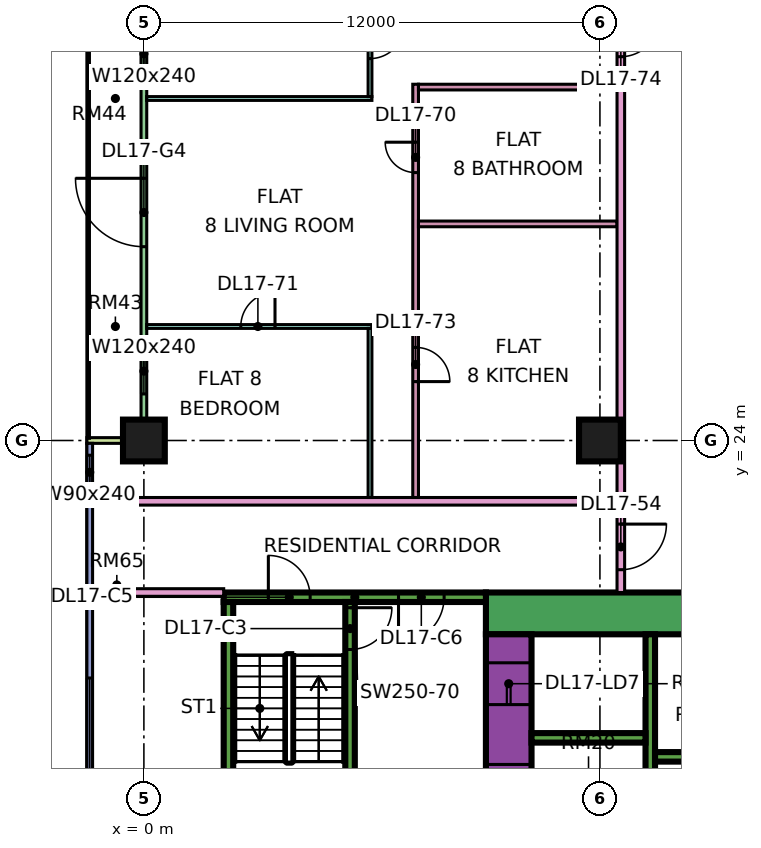
"""IFC4 building model, lengths in metres.
Left out: names, types, materials, properties, quantities, classifications, styles, units other than length and angle.
Written with IfcOpenShell. Run it as: python <this file> out.ifc"""

import sys

from ifc_helpers import new_model, si_unit, direction, frame, frame_2d, origin, origin_2d, place, context, subcontext, project, spatial, rectangle, extrude, element, fill, save


model = new_model("IFC4")
c1 = context("Model", 3, precision=1e-05, world=origin(), true_north=direction((0.0, 1.0)))
c2 = subcontext(c1, "Body", "Model", "MODEL_VIEW")
j1 = project(units=[si_unit("LENGTHUNIT", "METRE"), si_unit("PLANEANGLEUNIT", "RADIAN")], contexts=[c1])
p1 = place(None, origin())
s1 = spatial("IfcSite", under=j1, at=p1, CompositionType="ELEMENT")
p2 = place(p1, origin())
s2 = spatial("IfcBuilding", under=s1, at=p2, CompositionType="ELEMENT")
p3 = place(p2, frame((0.0, 0.0, 78.9)))
s3 = spatial("IfcBuildingStorey", under=s2, at=p3, CompositionType="ELEMENT", Elevation=78.9)
for number, where, z_axis, x_axis in (
    (1, (0.0, 24.0, 0.0), (0.0, 0.0, 1.0), (1.0, 0.0, 0.0)),
    (2, (12.0, 24.0, 0.0), (0.0, 0.0, 1.0), (1.0, 0.0, 0.0)),
):
    element("IfcColumn", number, at=place(p3, frame(where, z_axis=z_axis, x_axis=x_axis)), inside=s3, PredefinedType="COLUMN", context=c2, shape_type="SweptSolid", body=[
        extrude(rectangle(XDim=1.1, YDim=1.1, at=origin_2d()), origin(), (0.0, 0.0, 1.0), 3.75),
    ])
p4 = place(p3, frame((9.0, 19.45, 0.0), z_axis=(0.0, 0.0, 1.0), x_axis=(1.0, 0.0, 0.0)))
e3 = element("IfcWall", 3, at=p4, inside=s3, PredefinedType="SHEAR", context=c2, shape_type="SweptSolid", body=[
    extrude(rectangle(XDim=25.0, YDim=1.1, at=frame_2d((12.5, 0.0))), origin(), (0.0, 0.0, 1.0), 3.75),
])
p5 = place(p4, frame((19.1, 0.0, 0.0)))
e4 = element("IfcOpeningElement", 4, at=p5, cuts=e3, PredefinedType="OPENING", context=c2, shape_type="SweptSolid", body=[
    extrude(rectangle(XDim=1.8, YDim=2.4, at=frame_2d((0.9, 1.2))), frame((0.0, 0.56, 0.0), z_axis=(0.0, -1.0, 0.0), x_axis=(1.0, 0.0, 0.0)), (0.0, 0.0, 1.0), 1.12),
])
p6 = place(p3, frame((9.6, 8.1, 0.0), z_axis=(0.0, 0.0, 1.0), x_axis=(0.0, 1.0, 0.0)))
e5 = element("IfcWall", 5, at=p6, inside=s3, PredefinedType="SHEAR", context=c2, shape_type="SweptSolid", body=[
    extrude(rectangle(XDim=10.8, YDim=1.2, at=frame_2d((5.4, 0.0))), origin(), (0.0, 0.0, 1.0), 3.75),
])
p7 = place(p6, frame((3.775, 0.0, 0.0)))
e6 = element("IfcOpeningElement", 6, at=p7, cuts=e5, PredefinedType="OPENING", context=c2, shape_type="SweptSolid", body=[
    extrude(rectangle(XDim=1.1, YDim=2.2, at=frame_2d((0.55, 1.1))), frame((0.0, 0.61, 0.0), z_axis=(0.0, -1.0, 0.0), x_axis=(1.0, 0.0, 0.0)), (0.0, 0.0, 1.0), 1.22),
])
p8 = place(p6, frame((6.275, 0.0, 0.0)))
e7 = element("IfcOpeningElement", 7, at=p8, cuts=e5, PredefinedType="OPENING", context=c2, shape_type="SweptSolid", body=[
    extrude(rectangle(XDim=1.1, YDim=2.2, at=frame_2d((0.55, 1.1))), frame((0.0, 0.61, 0.0), z_axis=(0.0, -1.0, 0.0), x_axis=(1.0, 0.0, 0.0)), (0.0, 0.0, 1.0), 1.22),
])
p9 = place(p6, frame((8.95, 0.0, 0.0)))
e8 = element("IfcOpeningElement", 8, at=p9, cuts=e5, PredefinedType="OPENING", context=c2, shape_type="SweptSolid", body=[
    extrude(rectangle(XDim=1.1, YDim=2.2, at=frame_2d((0.55, 1.1))), frame((0.0, 0.61, 0.0), z_axis=(0.0, -1.0, 0.0), x_axis=(1.0, 0.0, 0.0)), (0.0, 0.0, 1.0), 1.22),
])
p10 = place(p6, frame((1.45, 0.0, 0.0)))
e9 = element("IfcOpeningElement", 9, at=p10, cuts=e5, PredefinedType="OPENING", context=c2, shape_type="SweptSolid", body=[
    extrude(rectangle(XDim=0.9, YDim=2.1, at=frame_2d((0.45, 1.05))), frame((0.0, 0.61, 0.0), z_axis=(0.0, -1.0, 0.0), x_axis=(1.0, 0.0, 0.0)), (0.0, 0.0, 1.0), 1.22),
])
p11 = place(p3, frame((13.325, 8.1, 0.0), z_axis=(0.0, 0.0, 1.0), x_axis=(0.0, 1.0, 0.0)))
e10 = element("IfcWall", 10, at=p11, inside=s3, PredefinedType="SHEAR", context=c2, shape_type="SweptSolid", body=[
    extrude(rectangle(XDim=10.8, YDim=0.25, at=frame_2d((5.4, 0.0))), origin(), (0.0, 0.0, 1.0), 3.75),
])
p12 = place(p3, frame((13.45, 15.675, 0.0), z_axis=(0.0, 0.0, 1.0), x_axis=(1.0, 0.0, 0.0)))
e11 = element("IfcWall", 11, at=p12, inside=s3, PredefinedType="SHEAR", context=c2, shape_type="SweptSolid", body=[
    extrude(rectangle(XDim=13.75, YDim=0.25, at=frame_2d((6.875, 0.0))), origin(), (0.0, 0.0, 1.0), 3.75),
])
p13 = place(p3, frame((10.2, 16.175, 0.0), z_axis=(0.0, 0.0, 1.0), x_axis=(1.0, 0.0, 0.0)))
e12 = element("IfcWall", 12, at=p13, inside=s3, PredefinedType="SHEAR", context=c2, shape_type="SweptSolid", body=[
    extrude(rectangle(XDim=3.0, YDim=0.25, at=frame_2d((1.5, 0.0))), origin(), (0.0, 0.0, 1.0), 3.75),
])
p14 = place(p3, frame((2.1, 19.875, 0.0), z_axis=(0.0, 0.0, 1.0), x_axis=(1.0, 0.0, 0.0)))
e13 = element("IfcWall", 13, at=p14, inside=s3, PredefinedType="SHEAR", context=c2, shape_type="SweptSolid", body=[
    extrude(rectangle(XDim=6.9, YDim=0.25, at=frame_2d((3.45, 0.0))), origin(), (0.0, 0.0, 1.0), 3.75),
])
p15 = place(p14, frame((1.175, 0.0, 0.0)))
e14 = element("IfcOpeningElement", 14, at=p15, cuts=e13, PredefinedType="OPENING", context=c2, shape_type="SweptSolid", body=[
    extrude(rectangle(XDim=1.1, YDim=2.2, at=frame_2d((0.55, 1.1))), frame((0.0, 0.135, 0.0), z_axis=(0.0, -1.0, 0.0), x_axis=(1.0, 0.0, 0.0)), (0.0, 0.0, 1.0), 0.27),
])
p16 = place(p14, frame((4.6, 0.0, 0.0)))
e15 = element("IfcOpeningElement", 15, at=p16, cuts=e13, PredefinedType="OPENING", context=c2, shape_type="SweptSolid", body=[
    extrude(rectangle(XDim=1.2, YDim=2.2, at=frame_2d((0.6, 1.1))), frame((0.0, 0.135, 0.0), z_axis=(0.0, -1.0, 0.0), x_axis=(1.0, 0.0, 0.0)), (0.0, 0.0, 1.0), 0.27),
])
p17 = place(p3, frame((2.225, 13.25, 0.0), z_axis=(0.0, 0.0, 1.0), x_axis=(0.0, 1.0, 0.0)))
e16 = element("IfcWall", 16, at=p17, inside=s3, PredefinedType="SHEAR", context=c2, shape_type="SweptSolid", body=[
    extrude(rectangle(XDim=6.5, YDim=0.25, at=frame_2d((3.25, 0.0))), origin(), (0.0, 0.0, 1.0), 3.75),
])
p18 = place(p3, frame((5.425, 13.25, 0.0), z_axis=(0.0, 0.0, 1.0), x_axis=(0.0, 1.0, 0.0)))
e17 = element("IfcWall", 17, at=p18, inside=s3, PredefinedType="SHEAR", context=c2, shape_type="SweptSolid", body=[
    extrude(rectangle(XDim=6.5, YDim=0.25, at=frame_2d((3.25, 0.0))), origin(), (0.0, 0.0, 1.0), 3.75),
])
p19 = place(p18, frame((5.25, 0.0, 0.0)))
e18 = element("IfcOpeningElement", 18, at=p19, cuts=e17, PredefinedType="OPENING", context=c2, shape_type="SweptSolid", body=[
    extrude(rectangle(XDim=1.1, YDim=2.2, at=frame_2d((0.55, 1.1))), frame((0.0, 0.135, 0.0), z_axis=(0.0, -1.0, 0.0), x_axis=(1.0, 0.0, 0.0)), (0.0, 0.0, 1.0), 0.27),
])
p20 = place(p3, frame((0.0, 35.925, 0.0), z_axis=(0.0, 0.0, 1.0), x_axis=(0.0, -1.0, 0.0)))
e19 = element("IfcWall", 19, at=p20, inside=s3, PredefinedType="SOLIDWALL", context=c2, shape_type="SweptSolid", body=[
    extrude(rectangle(XDim=11.85, YDim=0.15, at=frame_2d((5.925, 0.0))), origin(), (0.0, 0.0, 1.0), 3.35),
])
p21 = place(p20, frame((1.15, 0.0, 0.45)))
e20 = element("IfcOpeningElement", 20, at=p21, cuts=e19, PredefinedType="OPENING", context=c2, shape_type="SweptSolid", body=[
    extrude(rectangle(XDim=1.2, YDim=2.4, at=frame_2d((0.6, 1.2))), frame((0.0, 0.085, 0.0), z_axis=(0.0, -1.0, 0.0), x_axis=(1.0, 0.0, 0.0)), (0.0, 0.0, 1.0), 0.17),
])
p22 = place(p20, frame((5.025, 0.0, 0.0)))
e21 = element("IfcOpeningElement", 21, at=p22, cuts=e19, PredefinedType="OPENING", context=c2, shape_type="SweptSolid", body=[
    extrude(rectangle(XDim=1.8, YDim=2.4, at=frame_2d((0.9, 1.2))), frame((0.0, 0.085, 0.0), z_axis=(0.0, -1.0, 0.0), x_axis=(1.0, 0.0, 0.0)), (0.0, 0.0, 1.0), 0.17),
])
p23 = place(p20, frame((9.5, 0.0, 0.45)))
e22 = element("IfcOpeningElement", 22, at=p23, cuts=e19, PredefinedType="OPENING", context=c2, shape_type="SweptSolid", body=[
    extrude(rectangle(XDim=1.2, YDim=2.4, at=frame_2d((0.6, 1.2))), frame((0.0, 0.085, 0.0), z_axis=(0.0, -1.0, 0.0), x_axis=(1.0, 0.0, 0.0)), (0.0, 0.0, 1.0), 0.17),
])
p24 = place(p3, frame((-1.5, 24.0, 0.0), z_axis=(0.0, 0.0, 1.0), x_axis=(1.0, 0.0, 0.0)))
e23 = element("IfcWall", 23, at=p24, inside=s3, PredefinedType="SOLIDWALL", context=c2, shape_type="SweptSolid", body=[
    extrude(rectangle(XDim=1.5, YDim=0.15, at=frame_2d((0.75, 0.0))), origin(), (0.0, 0.0, 1.0), 3.35),
])
p25 = place(p3, frame((-1.425, 23.925, 0.0), z_axis=(0.0, 0.0, 1.0), x_axis=(0.0, -1.0, 0.0)))
e24 = element("IfcWall", 24, at=p25, inside=s3, PredefinedType="SOLIDWALL", context=c2, shape_type="SweptSolid", body=[
    extrude(rectangle(XDim=11.425, YDim=0.15, at=frame_2d((5.712, 0.0))), origin(), (0.0, 0.0, 1.0), 3.35),
])
p26 = place(p25, frame((0.312, 0.0, 0.45)))
e25 = element("IfcOpeningElement", 25, at=p26, cuts=e24, PredefinedType="OPENING", context=c2, shape_type="SweptSolid", body=[
    extrude(rectangle(XDim=0.9, YDim=2.4, at=frame_2d((0.45, 1.2))), frame((0.0, 0.085, 0.0), z_axis=(0.0, -1.0, 0.0), x_axis=(1.0, 0.0, 0.0)), (0.0, 0.0, 1.0), 0.17),
])
p27 = place(p25, frame((6.175, 0.0, 0.45)))
e26 = element("IfcOpeningElement", 26, at=p27, cuts=e24, PredefinedType="OPENING", context=c2, shape_type="SweptSolid", body=[
    extrude(rectangle(XDim=3.0, YDim=2.4, at=frame_2d((1.5, 1.2))), frame((0.0, 0.085, 0.0), z_axis=(0.0, -1.0, 0.0), x_axis=(1.0, 0.0, 0.0)), (0.0, 0.0, 1.0), 0.17),
])
p28 = place(p3, frame((-1.35, 20.0, 0.0), z_axis=(0.0, 0.0, 1.0), x_axis=(1.0, 0.0, 0.0)))
e27 = element("IfcWall", 27, at=p28, inside=s3, PredefinedType="PARTITIONING", context=c2, shape_type="SweptSolid", body=[
    extrude(rectangle(XDim=3.45, YDim=0.2, at=frame_2d((1.725, 0.0))), origin(), (0.0, 0.0, 1.0), 3.35),
])
p29 = place(p3, frame((-1.35, 22.4, 0.0), z_axis=(0.0, 0.0, 1.0), x_axis=(1.0, 0.0, 0.0)))
e28 = element("IfcWall", 28, at=p29, inside=s3, PredefinedType="PARTITIONING", context=c2, shape_type="SweptSolid", body=[
    extrude(rectangle(XDim=13.8, YDim=0.2, at=frame_2d((6.9, 0.0))), origin(), (0.0, 0.0, 1.0), 3.35),
])
p30 = place(p3, frame((0.074, 27.0, 0.0), z_axis=(0.0, 0.0, 1.0), x_axis=(1.0, 0.0, 0.0)))
e29 = element("IfcWall", 29, at=p30, inside=s3, PredefinedType="PARTITIONING", context=c2, shape_type="SweptSolid", body=[
    extrude(rectangle(XDim=5.926, YDim=0.1, at=frame_2d((2.963, 0.0))), origin(), (0.0, 0.0, 1.0), 3.35),
])
p31 = place(p30, frame((2.476, 0.0, 0.0)))
e30 = element("IfcOpeningElement", 30, at=p31, cuts=e29, PredefinedType="OPENING", context=c2, shape_type="SweptSolid", body=[
    extrude(rectangle(XDim=0.9, YDim=2.1, at=frame_2d((0.45, 1.05))), frame((0.0, 0.06, 0.0), z_axis=(0.0, -1.0, 0.0), x_axis=(1.0, 0.0, 0.0)), (0.0, 0.0, 1.0), 0.12),
])
p32 = place(p3, frame((0.074, 33.0, 0.0), z_axis=(0.0, 0.0, 1.0), x_axis=(1.0, 0.0, 0.0)))
e31 = element("IfcWall", 31, at=p32, inside=s3, PredefinedType="PARTITIONING", context=c2, shape_type="SweptSolid", body=[
    extrude(rectangle(XDim=5.926, YDim=0.1, at=frame_2d((2.963, 0.0))), origin(), (0.0, 0.0, 1.0), 3.35),
])
p33 = place(p3, frame((5.95, 22.5, 0.0), z_axis=(0.0, 0.0, 1.0), x_axis=(0.0, 1.0, 0.0)))
e32 = element("IfcWall", 32, at=p33, inside=s3, PredefinedType="PARTITIONING", context=c2, shape_type="SweptSolid", body=[
    extrude(rectangle(XDim=4.45, YDim=0.1, at=frame_2d((2.225, 0.0))), origin(), (0.0, 0.0, 1.0), 3.35),
])
p34 = place(p3, frame((5.95, 33.05, 0.0), z_axis=(0.0, 0.0, 1.0), x_axis=(0.0, 1.0, 0.0)))
e33 = element("IfcWall", 33, at=p34, inside=s3, PredefinedType="PARTITIONING", context=c2, shape_type="SweptSolid", body=[
    extrude(rectangle(XDim=2.85, YDim=0.1, at=frame_2d((1.425, 0.0))), origin(), (0.0, 0.0, 1.0), 3.35),
])
p35 = place(p34, frame((1.0, 0.0, 0.0)))
e34 = element("IfcOpeningElement", 34, at=p35, cuts=e33, PredefinedType="OPENING", context=c2, shape_type="SweptSolid", body=[
    extrude(rectangle(XDim=0.9, YDim=2.1, at=frame_2d((0.45, 1.05))), frame((0.0, 0.06, 0.0), z_axis=(0.0, -1.0, 0.0), x_axis=(1.0, 0.0, 0.0)), (0.0, 0.0, 1.0), 0.12),
])
p36 = place(p3, frame((7.15, 22.5, 0.0), z_axis=(0.0, 0.0, 1.0), x_axis=(0.0, 1.0, 0.0)))
e35 = element("IfcWall", 35, at=p36, inside=s3, PredefinedType="PARTITIONING", context=c2, shape_type="SweptSolid", body=[
    extrude(rectangle(XDim=10.875, YDim=0.15, at=frame_2d((5.438, 0.0))), origin(), (0.0, 0.0, 1.0), 3.35),
])
p37 = place(p36, frame((8.55, 0.0, 0.0)))
e36 = element("IfcOpeningElement", 36, at=p37, cuts=e35, PredefinedType="OPENING", context=c2, shape_type="SweptSolid", body=[
    extrude(rectangle(XDim=0.8, YDim=2.1, at=frame_2d((0.4, 1.05))), frame((0.0, 0.085, 0.0), z_axis=(0.0, -1.0, 0.0), x_axis=(1.0, 0.0, 0.0)), (0.0, 0.0, 1.0), 0.17),
])
p38 = place(p36, frame((3.05, 0.0, 0.0)))
e37 = element("IfcOpeningElement", 37, at=p38, cuts=e35, PredefinedType="OPENING", context=c2, shape_type="SweptSolid", body=[
    extrude(rectangle(XDim=0.9, YDim=2.1, at=frame_2d((0.45, 1.05))), frame((0.0, 0.085, 0.0), z_axis=(0.0, -1.0, 0.0), x_axis=(1.0, 0.0, 0.0)), (0.0, 0.0, 1.0), 0.17),
])
for number, where, z_axis, x_axis in (
    (38, (7.225, 29.7, 0.0), (0.0, 0.0, 1.0), (1.0, 0.0, 0.0)),
    (39, (7.225, 33.3, 0.0), (0.0, 0.0, 1.0), (1.0, 0.0, 0.0)),
):
    element("IfcWall", number, at=place(p3, frame(where, z_axis=z_axis, x_axis=x_axis)), inside=s3, PredefinedType="PARTITIONING", context=c2, shape_type="SweptSolid", body=[
        extrude(rectangle(XDim=5.225, YDim=0.15, at=frame_2d((2.612, 0.0))), origin(), (0.0, 0.0, 1.0), 3.35),
    ])
p39 = place(p3, frame((12.55, 20.0, 0.0), z_axis=(0.0, 0.0, 1.0), x_axis=(0.0, 1.0, 0.0)))
e40 = element("IfcWall", 40, at=p39, inside=s3, PredefinedType="PARTITIONING", context=c2, shape_type="SweptSolid", body=[
    extrude(rectangle(XDim=43.0, YDim=0.2, at=frame_2d((21.5, 0.0))), origin(), (0.0, 0.0, 1.0), 3.35),
])
p40 = place(p39, frame((16.95, 0.0, 0.0)))
e41 = element("IfcOpeningElement", 41, at=p40, cuts=e40, PredefinedType="OPENING", context=c2, shape_type="SweptSolid", body=[
    extrude(rectangle(XDim=1.0, YDim=2.1, at=frame_2d((0.5, 1.05))), frame((0.0, 0.11, 0.0), z_axis=(0.0, -1.0, 0.0), x_axis=(1.0, 0.0, 0.0)), (0.0, 0.0, 1.0), 0.22),
])
p41 = place(p39, frame((35.25, 0.0, 0.0)))
e42 = element("IfcOpeningElement", 42, at=p41, cuts=e40, PredefinedType="OPENING", context=c2, shape_type="SweptSolid", body=[
    extrude(rectangle(XDim=1.0, YDim=2.1, at=frame_2d((0.5, 1.05))), frame((0.0, 0.11, 0.0), z_axis=(0.0, -1.0, 0.0), x_axis=(1.0, 0.0, 0.0)), (0.0, 0.0, 1.0), 0.22),
])
p42 = place(p39, frame((0.6, 0.0, 0.0)))
e43 = element("IfcOpeningElement", 43, at=p42, cuts=e40, PredefinedType="OPENING", context=c2, shape_type="SweptSolid", body=[
    extrude(rectangle(XDim=1.2, YDim=2.1, at=frame_2d((0.6, 1.05))), frame((0.0, 0.11, 0.0), z_axis=(0.0, -1.0, 0.0), x_axis=(1.0, 0.0, 0.0)), (0.0, 0.0, 1.0), 0.22),
])
p43 = place(p39, frame((14.1, 0.0, 0.0)))
e44 = element("IfcOpeningElement", 44, at=p43, cuts=e40, PredefinedType="OPENING", context=c2, shape_type="SweptSolid", body=[
    extrude(rectangle(XDim=1.0, YDim=2.1, at=frame_2d((0.5, 1.05))), frame((0.0, 0.11, 0.0), z_axis=(0.0, -1.0, 0.0), x_axis=(1.0, 0.0, 0.0)), (0.0, 0.0, 1.0), 0.22),
])
p44 = place(p21, origin())
e45 = element("IfcWindow", 45, at=p44, inside=s3, PartitioningType="SINGLE_PANEL", PredefinedType="WINDOW", context=c2, shape_type="SweptSolid", body=[
    extrude(rectangle(XDim=1.2, YDim=2.4, at=frame_2d((0.6, 1.2))), frame((0.0, 0.03, 0.0), z_axis=(0.0, -1.0, 0.0), x_axis=(1.0, 0.0, 0.0)), (0.0, 0.0, 1.0), 0.06),
])
fill(e20, e45)
p45 = place(p22, frame((1.8, 0.0, 0.0), z_axis=(0.0, 0.0, 1.0), x_axis=(-1.0, 0.0, 0.0)))
e46 = element("IfcDoor", 46, at=p45, inside=s3, OperationType="DOUBLE_DOOR_SINGLE_SWING", PredefinedType="DOOR", context=c2, shape_type="SweptSolid", body=[
    extrude(rectangle(XDim=1.8, YDim=2.4, at=frame_2d((0.9, 1.2))), frame((0.0, 0.025, 0.0), z_axis=(0.0, -1.0, 0.0), x_axis=(1.0, 0.0, 0.0)), (0.0, 0.0, 1.0), 0.05),
])
fill(e21, e46)
p46 = place(p23, origin())
e47 = element("IfcWindow", 47, at=p46, inside=s3, PartitioningType="SINGLE_PANEL", PredefinedType="WINDOW", context=c2, shape_type="SweptSolid", body=[
    extrude(rectangle(XDim=1.2, YDim=2.4, at=frame_2d((0.6, 1.2))), frame((0.0, 0.03, 0.0), z_axis=(0.0, -1.0, 0.0), x_axis=(1.0, 0.0, 0.0)), (0.0, 0.0, 1.0), 0.06),
])
fill(e22, e47)
p47 = place(p26, origin())
e48 = element("IfcWindow", 48, at=p47, inside=s3, PartitioningType="SINGLE_PANEL", PredefinedType="WINDOW", context=c2, shape_type="SweptSolid", body=[
    extrude(rectangle(XDim=0.9, YDim=2.4, at=frame_2d((0.45, 1.2))), frame((0.0, 0.03, 0.0), z_axis=(0.0, -1.0, 0.0), x_axis=(1.0, 0.0, 0.0)), (0.0, 0.0, 1.0), 0.06),
])
fill(e25, e48)
p48 = place(p27, origin())
e49 = element("IfcWindow", 49, at=p48, inside=s3, PartitioningType="SINGLE_PANEL", PredefinedType="WINDOW", context=c2, shape_type="SweptSolid", body=[
    extrude(rectangle(XDim=3.0, YDim=2.4, at=frame_2d((1.5, 1.2))), frame((0.0, 0.03, 0.0), z_axis=(0.0, -1.0, 0.0), x_axis=(1.0, 0.0, 0.0)), (0.0, 0.0, 1.0), 0.06),
])
fill(e26, e49)
p49 = place(p8, origin())
e50 = element("IfcDoor", 50, at=p49, inside=s3, OperationType="DOUBLE_DOOR_SLIDING", PredefinedType="DOOR", context=c2, shape_type="SweptSolid", body=[
    extrude(rectangle(XDim=1.1, YDim=2.2, at=frame_2d((0.55, 1.1))), frame((0.0, 0.025, 0.0), z_axis=(0.0, -1.0, 0.0), x_axis=(1.0, 0.0, 0.0)), (0.0, 0.0, 1.0), 0.05),
])
fill(e7, e50)
p50 = place(p9, origin())
e51 = element("IfcDoor", 51, at=p50, inside=s3, OperationType="DOUBLE_DOOR_SLIDING", PredefinedType="DOOR", context=c2, shape_type="SweptSolid", body=[
    extrude(rectangle(XDim=1.1, YDim=2.2, at=frame_2d((0.55, 1.1))), frame((0.0, 0.025, 0.0), z_axis=(0.0, -1.0, 0.0), x_axis=(1.0, 0.0, 0.0)), (0.0, 0.0, 1.0), 0.05),
])
fill(e8, e51)
p51 = place(p19, origin())
e52 = element("IfcDoor", 52, at=p51, inside=s3, OperationType="SINGLE_SWING_RIGHT", PredefinedType="DOOR", context=c2, shape_type="SweptSolid", body=[
    extrude(rectangle(XDim=1.1, YDim=2.2, at=frame_2d((0.55, 1.1))), frame((0.0, 0.025, 0.0), z_axis=(0.0, -1.0, 0.0), x_axis=(1.0, 0.0, 0.0)), (0.0, 0.0, 1.0), 0.05),
])
fill(e18, e52)
p52 = place(p15, origin())
e53 = element("IfcDoor", 53, at=p52, inside=s3, OperationType="SINGLE_SWING_LEFT", PredefinedType="DOOR", context=c2, shape_type="SweptSolid", body=[
    extrude(rectangle(XDim=1.1, YDim=2.2, at=frame_2d((0.55, 1.1))), frame((0.0, 0.025, 0.0), z_axis=(0.0, -1.0, 0.0), x_axis=(1.0, 0.0, 0.0)), (0.0, 0.0, 1.0), 0.05),
])
fill(e14, e53)
p53 = place(p16, frame((1.2, 0.0, 0.0), z_axis=(0.0, 0.0, 1.0), x_axis=(-1.0, 0.0, 0.0)))
e54 = element("IfcDoor", 54, at=p53, inside=s3, OperationType="SINGLE_SWING_LEFT", PredefinedType="DOOR", context=c2, shape_type="SweptSolid", body=[
    extrude(rectangle(XDim=1.2, YDim=2.2, at=frame_2d((0.6, 1.1))), frame((0.0, 0.025, 0.0), z_axis=(0.0, -1.0, 0.0), x_axis=(1.0, 0.0, 0.0)), (0.0, 0.0, 1.0), 0.05),
])
fill(e15, e54)
p54 = place(p42, origin())
e55 = element("IfcDoor", 55, at=p54, inside=s3, OperationType="SINGLE_SWING_RIGHT", PredefinedType="DOOR", context=c2, shape_type="SweptSolid", body=[
    extrude(rectangle(XDim=1.2, YDim=2.1, at=frame_2d((0.6, 1.05))), frame((0.0, 0.025, 0.0), z_axis=(0.0, -1.0, 0.0), x_axis=(1.0, 0.0, 0.0)), (0.0, 0.0, 1.0), 0.05),
])
fill(e43, e55)
p55 = place(p37, frame((0.8, 0.0, 0.0), z_axis=(0.0, 0.0, 1.0), x_axis=(-1.0, 0.0, 0.0)))
e56 = element("IfcDoor", 56, at=p55, inside=s3, OperationType="SINGLE_SWING_RIGHT", PredefinedType="DOOR", context=c2, shape_type="SweptSolid", body=[
    extrude(rectangle(XDim=0.8, YDim=2.1, at=frame_2d((0.4, 1.05))), frame((0.0, 0.025, 0.0), z_axis=(0.0, -1.0, 0.0), x_axis=(1.0, 0.0, 0.0)), (0.0, 0.0, 1.0), 0.05),
])
fill(e36, e56)
p56 = place(p31, frame((0.9, 0.0, 0.0), z_axis=(0.0, 0.0, 1.0), x_axis=(-1.0, 0.0, 0.0)))
e57 = element("IfcDoor", 57, at=p56, inside=s3, OperationType="SINGLE_SWING_RIGHT", PredefinedType="DOOR", context=c2, shape_type="SweptSolid", body=[
    extrude(rectangle(XDim=0.9, YDim=2.1, at=frame_2d((0.45, 1.05))), frame((0.0, 0.025, 0.0), z_axis=(0.0, -1.0, 0.0), x_axis=(1.0, 0.0, 0.0)), (0.0, 0.0, 1.0), 0.05),
])
fill(e30, e57)
p57 = place(p35, origin())
e58 = element("IfcDoor", 58, at=p57, inside=s3, OperationType="SINGLE_SWING_RIGHT", PredefinedType="DOOR", context=c2, shape_type="SweptSolid", body=[
    extrude(rectangle(XDim=0.9, YDim=2.1, at=frame_2d((0.45, 1.05))), frame((0.0, 0.025, 0.0), z_axis=(0.0, -1.0, 0.0), x_axis=(1.0, 0.0, 0.0)), (0.0, 0.0, 1.0), 0.05),
])
fill(e34, e58)
p58 = place(p38, frame((0.9, 0.0, 0.0), z_axis=(0.0, 0.0, 1.0), x_axis=(-1.0, 0.0, 0.0)))
e59 = element("IfcDoor", 59, at=p58, inside=s3, OperationType="SINGLE_SWING_LEFT", PredefinedType="DOOR", context=c2, shape_type="SweptSolid", body=[
    extrude(rectangle(XDim=0.9, YDim=2.1, at=frame_2d((0.45, 1.05))), frame((0.0, 0.025, 0.0), z_axis=(0.0, -1.0, 0.0), x_axis=(1.0, 0.0, 0.0)), (0.0, 0.0, 1.0), 0.05),
])
fill(e37, e59)
p59 = place(p43, origin())
e60 = element("IfcDoor", 60, at=p59, inside=s3, OperationType="SINGLE_SWING_RIGHT", PredefinedType="DOOR", context=c2, shape_type="SweptSolid", body=[
    extrude(rectangle(XDim=1.0, YDim=2.1, at=frame_2d((0.5, 1.05))), frame((0.0, 0.025, 0.0), z_axis=(0.0, -1.0, 0.0), x_axis=(1.0, 0.0, 0.0)), (0.0, 0.0, 1.0), 0.05),
])
fill(e44, e60)
save(model, sys.argv[1])
